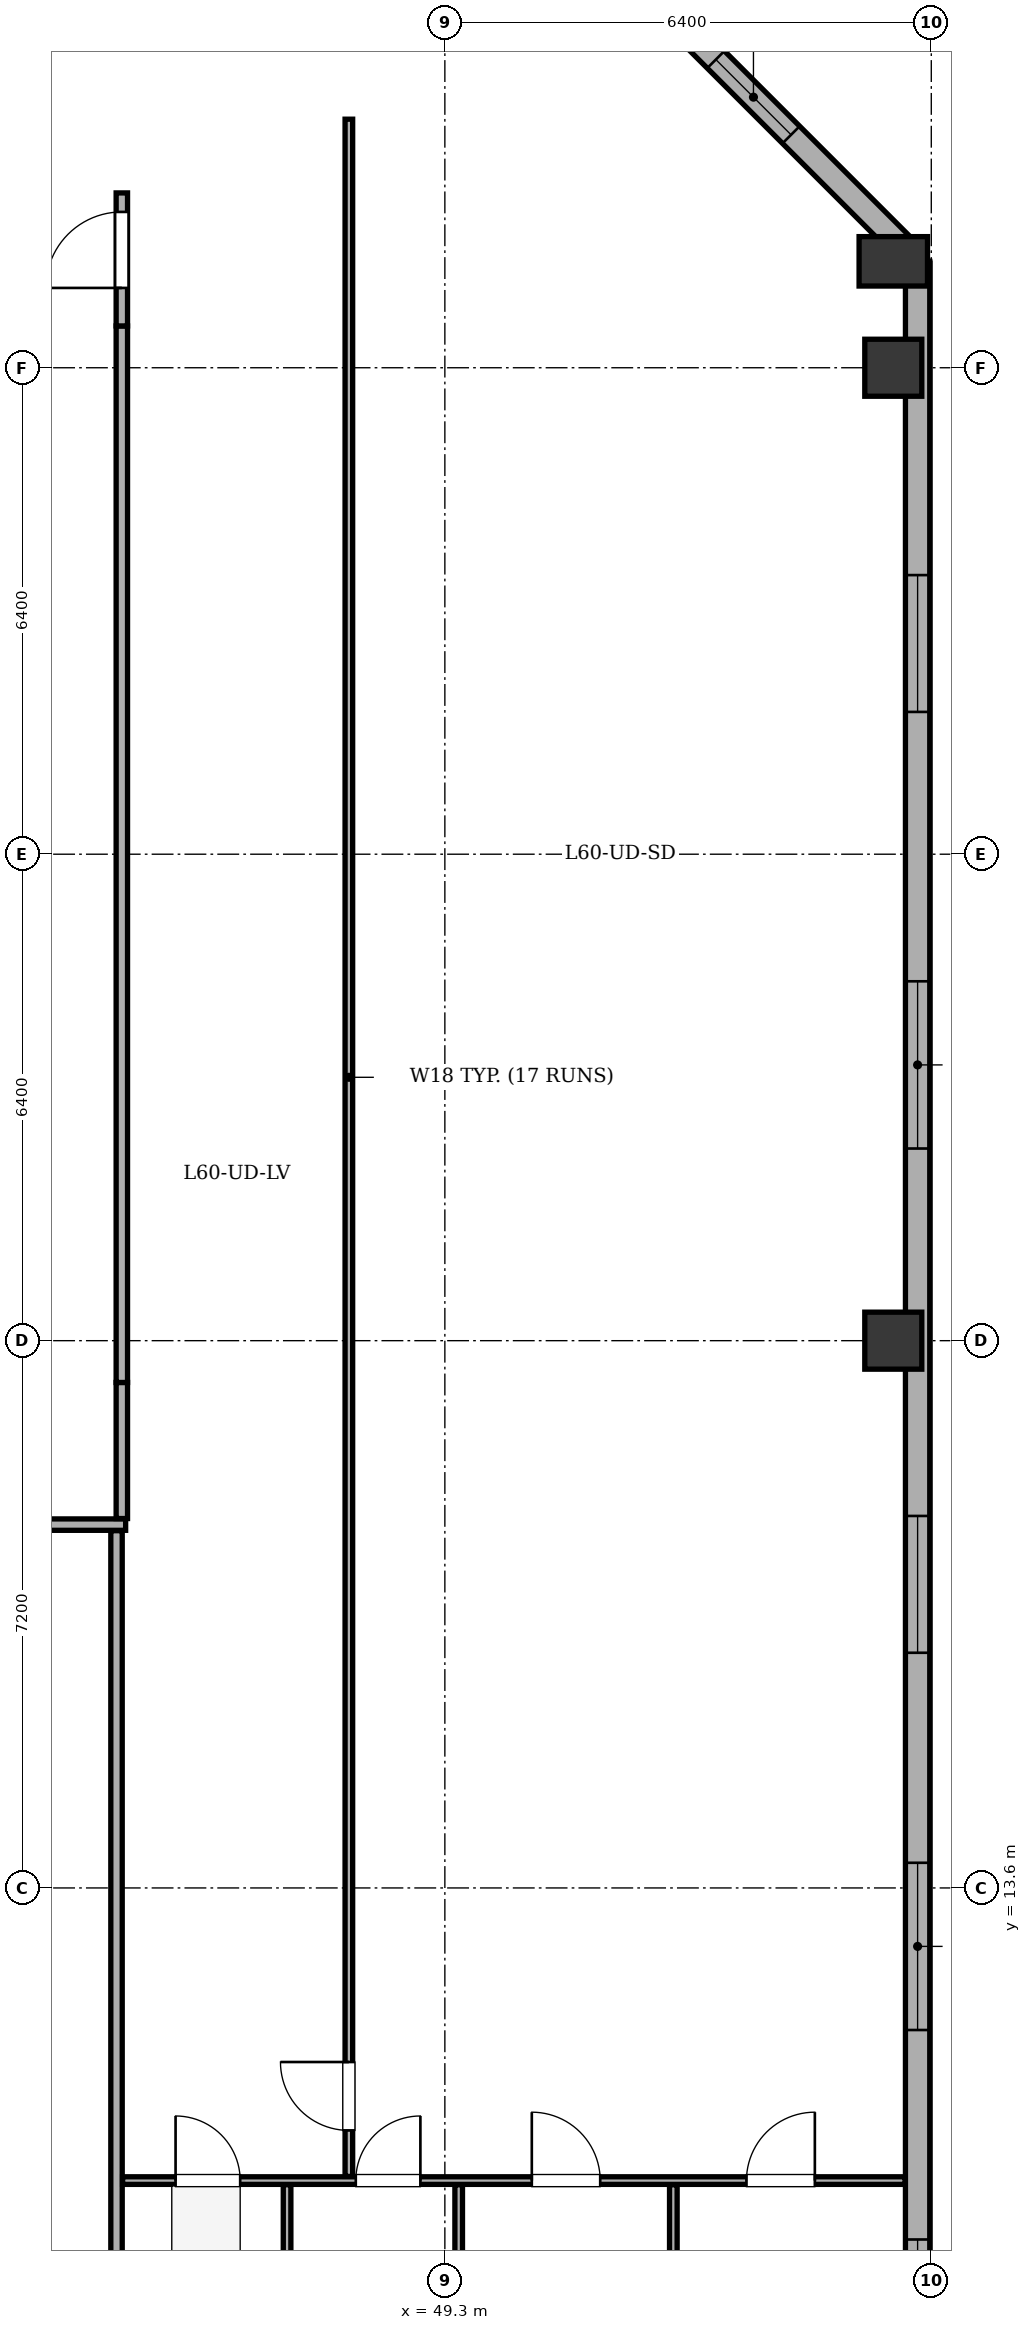
"""IFC4 building model, lengths in metres.
Left out: names, types, materials, properties, quantities, classifications, styles, units other than length and angle.
Written with IfcOpenShell. Run it as: python <this file> out.ifc"""

import sys

from ifc_helpers import new_model, si_unit, direction, frame, frame_2d, origin, origin_2d, place, context, subcontext, project, spatial, rectangle, extrude, element, fill, save


model = new_model("IFC4")
c1 = context("Model", 3, precision=1e-05, world=origin(), true_north=direction((0.0, 1.0)))
c2 = subcontext(c1, "Body", "Model", "MODEL_VIEW")
j1 = project(units=[si_unit("LENGTHUNIT", "METRE"), si_unit("PLANEANGLEUNIT", "RADIAN")], contexts=[c1])
p1 = place(None, origin())
s1 = spatial("IfcSite", under=j1, at=p1, CompositionType="ELEMENT")
p2 = place(p1, origin())
s2 = spatial("IfcBuilding", under=s1, at=p2, CompositionType="ELEMENT")
p3 = place(p2, frame((0.0, 0.0, 231.3)))
s3 = spatial("IfcBuildingStorey", under=s2, at=p3, CompositionType="ELEMENT", Elevation=231.3)
for number, where, z_axis, x_axis in (
    (1, (55.2, 20.8, 0.0), (0.0, 0.0, 1.0), (1.0, 0.0, 0.0)),
    (2, (55.2, 33.6, 0.0), (0.0, 0.0, 1.0), (1.0, 0.0, 0.0)),
):
    element("IfcColumn", number, at=place(p3, frame(where, z_axis=z_axis, x_axis=x_axis)), inside=s3, PredefinedType="COLUMN", context=c2, shape_type="SweptSolid", body=[
        extrude(rectangle(XDim=0.75, YDim=0.75, at=origin_2d()), origin(), (0.0, 0.0, 1.0), 3.4),
    ])
p4 = place(p3, frame((55.2, 35.0, 0.0), z_axis=(0.0, 0.0, 1.0), x_axis=(1.0, 0.0, 0.0)))
e3 = element("IfcColumn", 3, at=p4, inside=s3, PredefinedType="COLUMN", context=c2, shape_type="SweptSolid", body=[
    extrude(rectangle(XDim=0.65, YDim=0.9, at=origin_2d()), origin(), (0.0, 0.0, 1.0), 3.4),
])
p5 = place(p3, frame((51.2, 39.32, 0.0), z_axis=(0.0, 0.0, 1.0), x_axis=(0.707106781187, -0.707106781187, 0.0)))
e4 = element("IfcWall", 4, at=p5, inside=s3, PredefinedType="STANDARD", context=c2, shape_type="SweptSolid", body=[
    extrude(rectangle(XDim=6.11, YDim=0.32, at=frame_2d((3.055, 0.0))), origin(), (0.0, 0.0, 1.0), 2.725),
])
p6 = place(p5, frame((2.355, 0.0, 0.75)))
e5 = element("IfcOpeningElement", 5, at=p6, cuts=e4, PredefinedType="OPENING", context=c2, shape_type="SweptSolid", body=[
    extrude(rectangle(XDim=1.4, YDim=1.65, at=frame_2d((0.7, 0.825))), frame((0.0, 0.17, 0.0), z_axis=(0.0, -1.0, 0.0), x_axis=(1.0, 0.0, 0.0)), (0.0, 0.0, 1.0), 0.34),
])
p7 = place(p3, frame((55.52, 35.0, 0.0), z_axis=(0.0, 0.0, 1.0), x_axis=(0.0, -1.0, 0.0)))
e6 = element("IfcWall", 6, at=p7, inside=s3, PredefinedType="STANDARD", context=c2, shape_type="SweptSolid", body=[
    extrude(rectangle(XDim=27.8, YDim=0.32, at=frame_2d((13.9, 0.0))), origin(), (0.0, 0.0, 1.0), 2.725),
])
p8 = place(p7, frame((4.128, 0.0, 0.75)))
e7 = element("IfcOpeningElement", 7, at=p8, cuts=e6, PredefinedType="OPENING", context=c2, shape_type="SweptSolid", body=[
    extrude(rectangle(XDim=1.8, YDim=1.7, at=frame_2d((0.9, 0.85))), frame((0.0, 0.17, 0.0), z_axis=(0.0, -1.0, 0.0), x_axis=(1.0, 0.0, 0.0)), (0.0, 0.0, 1.0), 0.34),
])
p9 = place(p7, frame((9.472, 0.0, 0.75)))
e8 = element("IfcOpeningElement", 8, at=p9, cuts=e6, PredefinedType="OPENING", context=c2, shape_type="SweptSolid", body=[
    extrude(rectangle(XDim=2.2, YDim=1.7, at=frame_2d((1.1, 0.85))), frame((0.0, 0.17, 0.0), z_axis=(0.0, -1.0, 0.0), x_axis=(1.0, 0.0, 0.0)), (0.0, 0.0, 1.0), 0.34),
])
p10 = place(p7, frame((16.506, 0.0, 0.75)))
e9 = element("IfcOpeningElement", 9, at=p10, cuts=e6, PredefinedType="OPENING", context=c2, shape_type="SweptSolid", body=[
    extrude(rectangle(XDim=1.8, YDim=1.7, at=frame_2d((0.9, 0.85))), frame((0.0, 0.17, 0.0), z_axis=(0.0, -1.0, 0.0), x_axis=(1.0, 0.0, 0.0)), (0.0, 0.0, 1.0), 0.34),
])
p11 = place(p7, frame((21.069, 0.0, 0.75)))
e10 = element("IfcOpeningElement", 10, at=p11, cuts=e6, PredefinedType="OPENING", context=c2, shape_type="SweptSolid", body=[
    extrude(rectangle(XDim=2.2, YDim=1.7, at=frame_2d((1.1, 0.85))), frame((0.0, 0.17, 0.0), z_axis=(0.0, -1.0, 0.0), x_axis=(1.0, 0.0, 0.0)), (0.0, 0.0, 1.0), 0.34),
])
p12 = place(p7, frame((26.025, 0.0, 0.75)))
e11 = element("IfcOpeningElement", 11, at=p12, cuts=e6, PredefinedType="OPENING", context=c2, shape_type="SweptSolid", body=[
    extrude(rectangle(XDim=0.75, YDim=1.45, at=frame_2d((0.375, 0.725))), frame((0.0, 0.17, 0.0), z_axis=(0.0, -1.0, 0.0), x_axis=(1.0, 0.0, 0.0)), (0.0, 0.0, 1.0), 0.34),
])
p13 = place(p3, frame((15.08, 18.38, 0.0), z_axis=(0.0, 0.0, 1.0), x_axis=(1.0, 0.0, 0.0)))
e12 = element("IfcWall", 12, at=p13, inside=s3, PredefinedType="PARTITIONING", context=c2, shape_type="SweptSolid", body=[
    extrude(rectangle(XDim=30.02, YDim=0.15, at=frame_2d((15.01, 0.0))), origin(), (0.0, 0.0, 1.0), 3.1),
])
p14 = place(p13, frame((4.385, 0.0, 0.0)))
e13 = element("IfcOpeningElement", 13, at=p14, cuts=e12, PredefinedType="OPENING", context=c2, shape_type="SweptSolid", body=[
    extrude(rectangle(XDim=1.0, YDim=2.1, at=frame_2d((0.5, 1.05))), frame((0.0, 0.085, 0.0), z_axis=(0.0, -1.0, 0.0), x_axis=(1.0, 0.0, 0.0)), (0.0, 0.0, 1.0), 0.17),
])
p15 = place(p13, frame((14.361, 0.0, 0.0)))
e14 = element("IfcOpeningElement", 14, at=p15, cuts=e12, PredefinedType="OPENING", context=c2, shape_type="SweptSolid", body=[
    extrude(rectangle(XDim=1.0, YDim=2.1, at=frame_2d((0.5, 1.05))), frame((0.0, 0.085, 0.0), z_axis=(0.0, -1.0, 0.0), x_axis=(1.0, 0.0, 0.0)), (0.0, 0.0, 1.0), 0.17),
])
p16 = place(p13, frame((24.486, 0.0, 0.0)))
e15 = element("IfcOpeningElement", 15, at=p16, cuts=e12, PredefinedType="OPENING", context=c2, shape_type="SweptSolid", body=[
    extrude(rectangle(XDim=1.0, YDim=2.1, at=frame_2d((0.5, 1.05))), frame((0.0, 0.085, 0.0), z_axis=(0.0, -1.0, 0.0), x_axis=(1.0, 0.0, 0.0)), (0.0, 0.0, 1.0), 0.17),
])
p17 = place(p3, frame((44.98, 3.045, 0.0), z_axis=(0.0, 0.0, 1.0), x_axis=(0.0, 1.0, 0.0)))
e16 = element("IfcWall", 16, at=p17, inside=s3, PredefinedType="PARTITIONING", context=c2, shape_type="SweptSolid", body=[
    extrude(rectangle(XDim=15.255, YDim=0.15, at=frame_2d((7.627, 0.0))), origin(), (0.0, 0.0, 1.0), 2.725),
])
p18 = place(p3, frame((45.05, 18.46, 0.0), z_axis=(0.0, 0.0, 1.0), x_axis=(0.0, 1.0, 0.0)))
e17 = element("IfcWall", 17, at=p18, inside=s3, PredefinedType="PARTITIONING", context=c2, shape_type="SweptSolid", body=[
    extrude(rectangle(XDim=1.79, YDim=0.15, at=frame_2d((0.895, 0.0))), origin(), (0.0, 0.0, 1.0), 2.725),
])
p19 = place(p3, frame((45.05, 20.25, 0.0), z_axis=(0.0, 0.0, 1.0), x_axis=(0.0, 1.0, 0.0)))
e18 = element("IfcWall", 18, at=p19, inside=s3, PredefinedType="PARTITIONING", context=c2, shape_type="SweptSolid", body=[
    extrude(rectangle(XDim=13.9, YDim=0.15, at=frame_2d((6.95, 0.0))), origin(), (0.0, 0.0, 1.0), 2.725),
])
p20 = place(p3, frame((45.05, 34.15, 0.0), z_axis=(0.0, 0.0, 1.0), x_axis=(0.0, 1.0, 0.0)))
e19 = element("IfcWall", 19, at=p20, inside=s3, PredefinedType="PARTITIONING", context=c2, shape_type="SweptSolid", body=[
    extrude(rectangle(XDim=1.75, YDim=0.15, at=frame_2d((0.875, 0.0))), origin(), (0.0, 0.0, 1.0), 2.725),
])
p21 = place(p20, frame((0.5, 0.0, 0.0)))
e20 = element("IfcOpeningElement", 20, at=p21, cuts=e19, PredefinedType="OPENING", context=c2, shape_type="SweptSolid", body=[
    extrude(rectangle(XDim=1.0, YDim=2.1, at=frame_2d((0.5, 1.05))), frame((0.0, 0.085, 0.0), z_axis=(0.0, -1.0, 0.0), x_axis=(1.0, 0.0, 0.0)), (0.0, 0.0, 1.0), 0.17),
])
p22 = place(p3, frame((45.06, 9.75, 0.0), z_axis=(0.0, 0.0, 1.0), x_axis=(1.0, 0.0, 0.0)))
e21 = element("IfcWall", 21, at=p22, inside=s3, PredefinedType="PARTITIONING", context=c2, shape_type="SweptSolid", body=[
    extrude(rectangle(XDim=10.295, YDim=0.1, at=frame_2d((5.147, 0.0))), origin(), (0.0, 0.0, 1.0), 3.1),
])
p23 = place(p22, frame((0.697, 0.0, 0.0)))
e22 = element("IfcOpeningElement", 22, at=p23, cuts=e21, PredefinedType="OPENING", context=c2, shape_type="SweptSolid", body=[
    extrude(rectangle(XDim=0.85, YDim=2.05, at=frame_2d((0.425, 1.025))), frame((0.0, 0.06, 0.0), z_axis=(0.0, -1.0, 0.0), x_axis=(1.0, 0.0, 0.0)), (0.0, 0.0, 1.0), 0.12),
])
p24 = place(p22, frame((3.068, 0.0, 0.0)))
e23 = element("IfcOpeningElement", 23, at=p24, cuts=e21, PredefinedType="OPENING", context=c2, shape_type="SweptSolid", body=[
    extrude(rectangle(XDim=0.85, YDim=2.05, at=frame_2d((0.425, 1.025))), frame((0.0, 0.06, 0.0), z_axis=(0.0, -1.0, 0.0), x_axis=(1.0, 0.0, 0.0)), (0.0, 0.0, 1.0), 0.12),
])
p25 = place(p22, frame((5.384, 0.0, 0.0)))
e24 = element("IfcOpeningElement", 24, at=p25, cuts=e21, PredefinedType="OPENING", context=c2, shape_type="SweptSolid", body=[
    extrude(rectangle(XDim=0.9, YDim=2.05, at=frame_2d((0.45, 1.025))), frame((0.0, 0.06, 0.0), z_axis=(0.0, -1.0, 0.0), x_axis=(1.0, 0.0, 0.0)), (0.0, 0.0, 1.0), 0.12),
])
p26 = place(p22, frame((8.208, 0.0, 0.0)))
e25 = element("IfcOpeningElement", 25, at=p26, cuts=e21, PredefinedType="OPENING", context=c2, shape_type="SweptSolid", body=[
    extrude(rectangle(XDim=0.9, YDim=2.05, at=frame_2d((0.45, 1.025))), frame((0.0, 0.06, 0.0), z_axis=(0.0, -1.0, 0.0), x_axis=(1.0, 0.0, 0.0)), (0.0, 0.0, 1.0), 0.12),
])
p27 = place(p3, frame((48.037, 9.805, 0.0), z_axis=(0.0, 0.0, 1.0), x_axis=(0.0, 1.0, 0.0)))
e26 = element("IfcWall", 26, at=p27, inside=s3, PredefinedType="PARTITIONING", context=c2, shape_type="SweptSolid", body=[
    extrude(rectangle(XDim=27.065, YDim=0.1, at=frame_2d((13.533, 0.0))), origin(), (0.0, 0.0, 1.0), 3.1),
])
p28 = place(p27, frame((0.605, 0.0, 0.0)))
e27 = element("IfcOpeningElement", 27, at=p28, cuts=e26, PredefinedType="OPENING", context=c2, shape_type="SweptSolid", body=[
    extrude(rectangle(XDim=0.9, YDim=2.05, at=frame_2d((0.45, 1.025))), frame((0.0, 0.06, 0.0), z_axis=(0.0, -1.0, 0.0), x_axis=(1.0, 0.0, 0.0)), (0.0, 0.0, 1.0), 0.12),
])
for number, where, z_axis, x_axis in (
    (28, (47.224, 7.08, 0.0), (0.0, 0.0, 1.0), (0.0, 1.0, 0.0)),
    (29, (49.482, 7.08, 0.0), (0.0, 0.0, 1.0), (0.0, 1.0, 0.0)),
):
    element("IfcWall", number, at=place(p3, frame(where, z_axis=z_axis, x_axis=x_axis)), inside=s3, PredefinedType="PARTITIONING", context=c2, shape_type="SweptSolid", body=[
        extrude(rectangle(XDim=2.615, YDim=0.1, at=frame_2d((1.308, 0.0))), origin(), (0.0, 0.0, 1.0), 2.725),
    ])
p29 = place(p3, frame((52.306, 7.08, 0.0), z_axis=(0.0, 0.0, 1.0), x_axis=(0.0, 1.0, 0.0)))
e30 = element("IfcWall", 30, at=p29, inside=s3, PredefinedType="PARTITIONING", context=c2, shape_type="SweptSolid", body=[
    extrude(rectangle(XDim=2.615, YDim=0.1, at=frame_2d((1.308, 0.0))), origin(), (0.0, 0.0, 1.0), 3.1),
])
p30 = place(p8, origin())
e31 = element("IfcWindow", 31, at=p30, inside=s3, PartitioningType="SINGLE_PANEL", PredefinedType="WINDOW", context=c2, shape_type="SweptSolid", body=[
    extrude(rectangle(XDim=1.8, YDim=1.7, at=frame_2d((0.9, 0.85))), frame((0.0, -0.01, 0.0), z_axis=(0.0, -1.0, 0.0), x_axis=(1.0, 0.0, 0.0)), (0.0, 0.0, 1.0), 0.06),
])
fill(e7, e31)
p31 = place(p9, origin())
e32 = element("IfcWindow", 32, at=p31, inside=s3, PartitioningType="SINGLE_PANEL", PredefinedType="WINDOW", context=c2, shape_type="SweptSolid", body=[
    extrude(rectangle(XDim=2.2, YDim=1.7, at=frame_2d((1.1, 0.85))), frame((0.0, -0.01, 0.0), z_axis=(0.0, -1.0, 0.0), x_axis=(1.0, 0.0, 0.0)), (0.0, 0.0, 1.0), 0.06),
])
fill(e8, e32)
p32 = place(p10, origin())
e33 = element("IfcWindow", 33, at=p32, inside=s3, PartitioningType="SINGLE_PANEL", PredefinedType="WINDOW", context=c2, shape_type="SweptSolid", body=[
    extrude(rectangle(XDim=1.8, YDim=1.7, at=frame_2d((0.9, 0.85))), frame((0.0, -0.01, 0.0), z_axis=(0.0, -1.0, 0.0), x_axis=(1.0, 0.0, 0.0)), (0.0, 0.0, 1.0), 0.06),
])
fill(e9, e33)
p33 = place(p11, origin())
e34 = element("IfcWindow", 34, at=p33, inside=s3, PartitioningType="SINGLE_PANEL", PredefinedType="WINDOW", context=c2, shape_type="SweptSolid", body=[
    extrude(rectangle(XDim=2.2, YDim=1.7, at=frame_2d((1.1, 0.85))), frame((0.0, -0.01, 0.0), z_axis=(0.0, -1.0, 0.0), x_axis=(1.0, 0.0, 0.0)), (0.0, 0.0, 1.0), 0.06),
])
fill(e10, e34)
p34 = place(p12, origin())
e35 = element("IfcWindow", 35, at=p34, inside=s3, PartitioningType="SINGLE_PANEL", PredefinedType="WINDOW", context=c2, shape_type="SweptSolid", body=[
    extrude(rectangle(XDim=0.75, YDim=1.45, at=frame_2d((0.375, 0.725))), frame((0.0, -0.01, 0.0), z_axis=(0.0, -1.0, 0.0), x_axis=(1.0, 0.0, 0.0)), (0.0, 0.0, 1.0), 0.06),
])
fill(e11, e35)
p35 = place(p6, origin())
e36 = element("IfcWindow", 36, at=p35, inside=s3, PartitioningType="SINGLE_PANEL", PredefinedType="WINDOW", context=c2, shape_type="SweptSolid", body=[
    extrude(rectangle(XDim=1.4, YDim=1.65, at=frame_2d((0.7, 0.825))), frame((0.0, -0.01, 0.0), z_axis=(0.0, -1.0, 0.0), x_axis=(1.0, 0.0, 0.0)), (0.0, 0.0, 1.0), 0.06),
])
fill(e5, e36)
p36 = place(p21, origin())
e37 = element("IfcDoor", 37, at=p36, inside=s3, OperationType="SINGLE_SWING_LEFT", PredefinedType="DOOR", context=c2, shape_type="SweptSolid", body=[
    extrude(rectangle(XDim=1.0, YDim=2.1, at=frame_2d((0.5, 1.05))), frame((0.0, 0.025, 0.0), z_axis=(0.0, -1.0, 0.0), x_axis=(1.0, 0.0, 0.0)), (0.0, 0.0, 1.0), 0.05),
])
fill(e20, e37)
p37 = place(p28, origin())
e38 = element("IfcDoor", 38, at=p37, inside=s3, OperationType="SINGLE_SWING_RIGHT", PredefinedType="DOOR", context=c2, shape_type="SweptSolid", body=[
    extrude(rectangle(XDim=0.9, YDim=2.05, at=frame_2d((0.45, 1.025))), frame((0.0, 0.025, 0.0), z_axis=(0.0, -1.0, 0.0), x_axis=(1.0, 0.0, 0.0)), (0.0, 0.0, 1.0), 0.05),
])
fill(e27, e38)
p38 = place(p23, origin())
e39 = element("IfcDoor", 39, at=p38, inside=s3, OperationType="SINGLE_SWING_LEFT", PredefinedType="DOOR", context=c2, shape_type="SweptSolid", body=[
    extrude(rectangle(XDim=0.85, YDim=2.05, at=frame_2d((0.425, 1.025))), frame((0.0, 0.025, 0.0), z_axis=(0.0, -1.0, 0.0), x_axis=(1.0, 0.0, 0.0)), (0.0, 0.0, 1.0), 0.05),
])
fill(e22, e39)
p39 = place(p24, origin())
e40 = element("IfcDoor", 40, at=p39, inside=s3, OperationType="SINGLE_SWING_RIGHT", PredefinedType="DOOR", context=c2, shape_type="SweptSolid", body=[
    extrude(rectangle(XDim=0.85, YDim=2.05, at=frame_2d((0.425, 1.025))), frame((0.0, 0.025, 0.0), z_axis=(0.0, -1.0, 0.0), x_axis=(1.0, 0.0, 0.0)), (0.0, 0.0, 1.0), 0.05),
])
fill(e23, e40)
p40 = place(p25, origin())
e41 = element("IfcDoor", 41, at=p40, inside=s3, OperationType="SINGLE_SWING_LEFT", PredefinedType="DOOR", context=c2, shape_type="SweptSolid", body=[
    extrude(rectangle(XDim=0.9, YDim=2.05, at=frame_2d((0.45, 1.025))), frame((0.0, 0.025, 0.0), z_axis=(0.0, -1.0, 0.0), x_axis=(1.0, 0.0, 0.0)), (0.0, 0.0, 1.0), 0.05),
])
fill(e24, e41)
p41 = place(p26, origin())
e42 = element("IfcDoor", 42, at=p41, inside=s3, OperationType="SINGLE_SWING_RIGHT", PredefinedType="DOOR", context=c2, shape_type="SweptSolid", body=[
    extrude(rectangle(XDim=0.9, YDim=2.05, at=frame_2d((0.45, 1.025))), frame((0.0, 0.025, 0.0), z_axis=(0.0, -1.0, 0.0), x_axis=(1.0, 0.0, 0.0)), (0.0, 0.0, 1.0), 0.05),
])
fill(e25, e42)
save(model, sys.argv[1])
